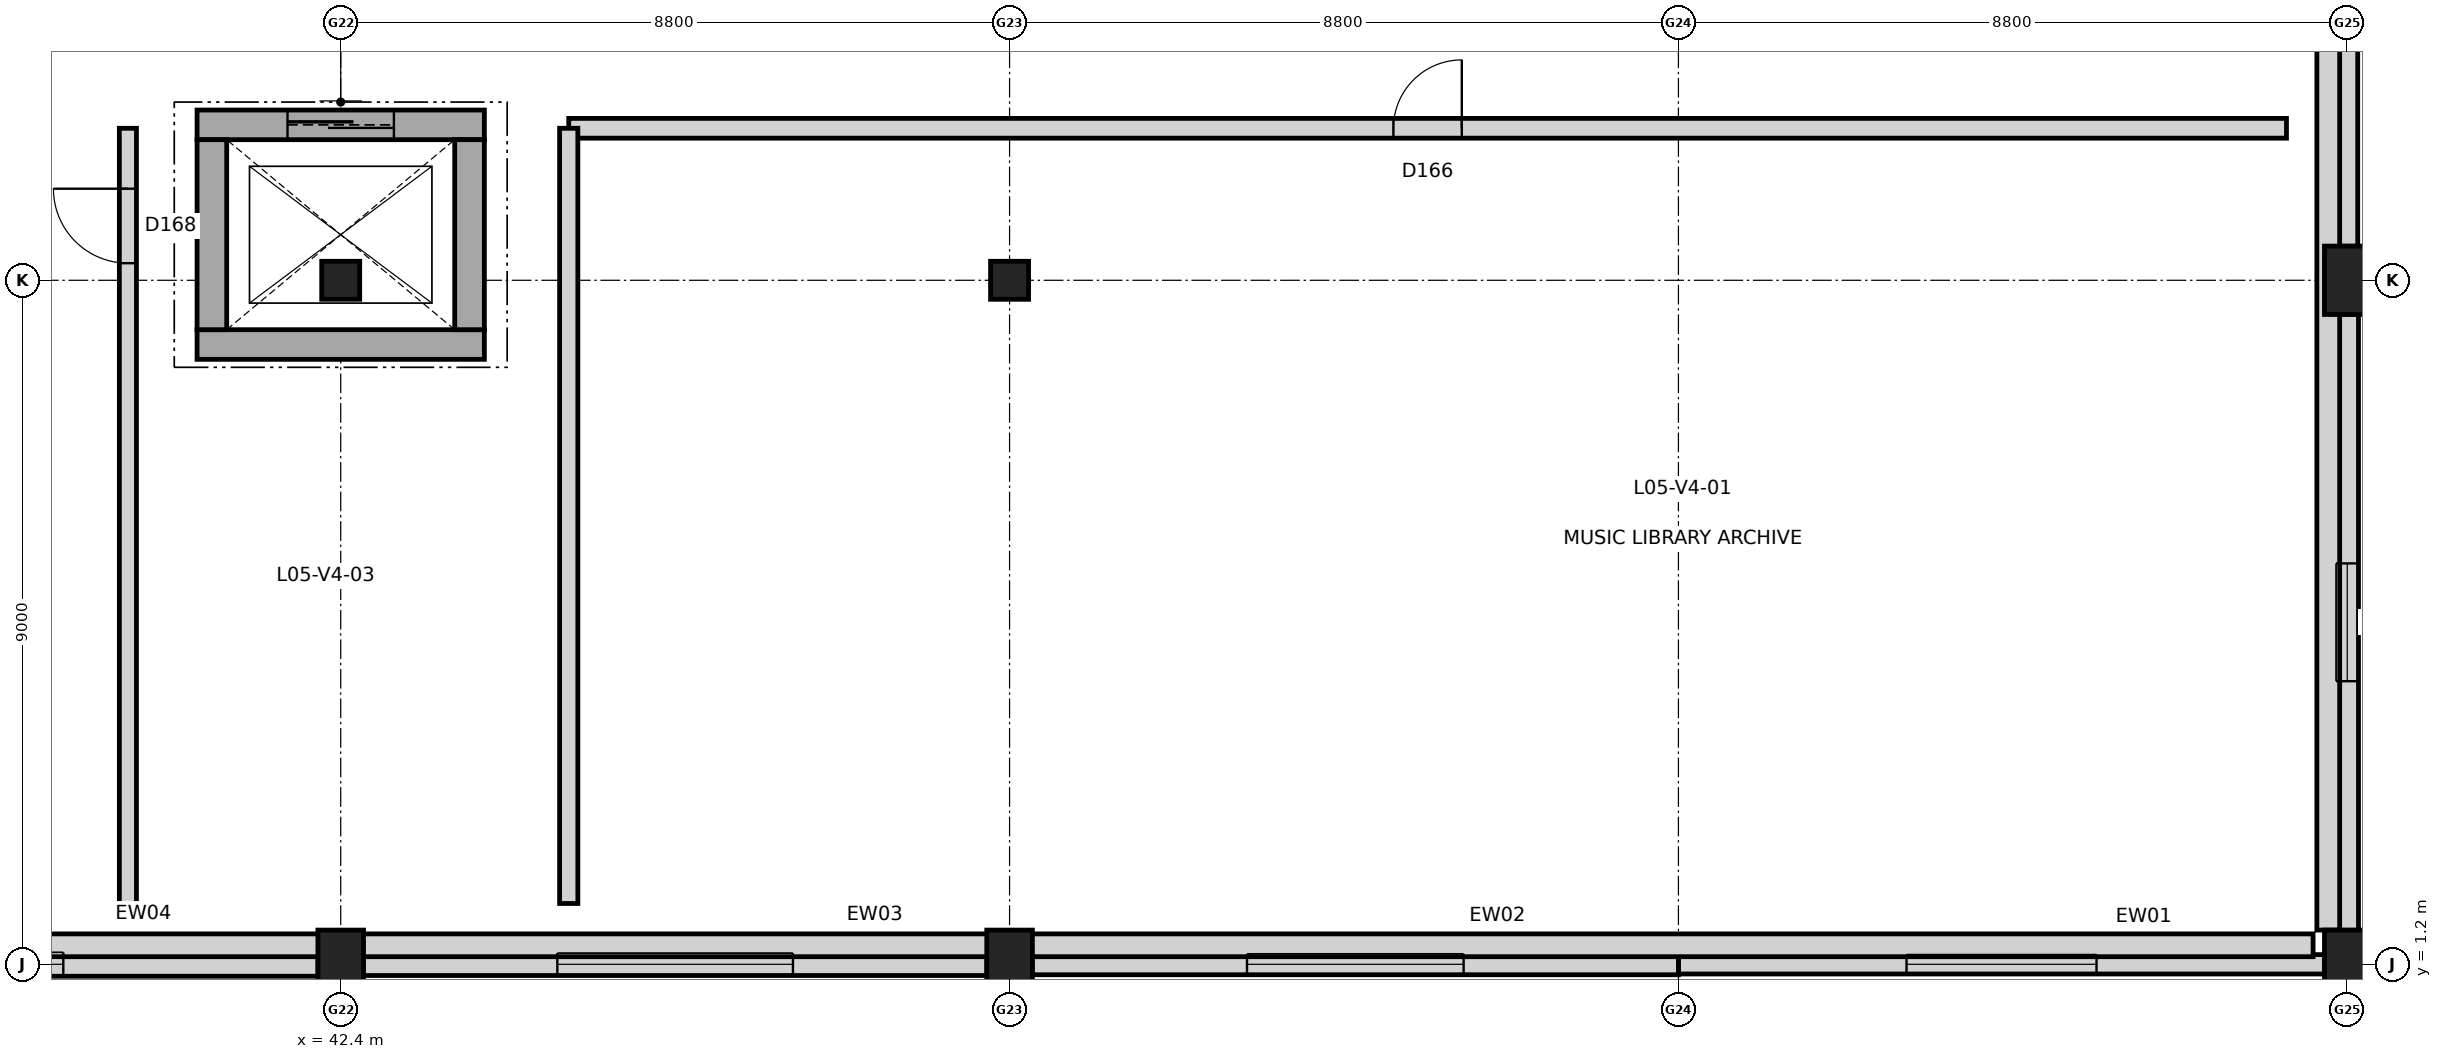
"""IFC4 building model, lengths in metres.
Left out: names, types, materials, properties, quantities, classifications, styles, units other than length and angle.
Written with IfcOpenShell. Run it as: python <this file> out.ifc"""

import sys

from ifc_helpers import new_model, si_unit, direction, frame, frame_2d, origin, origin_2d, place, context, subcontext, project, spatial, rectangle, extrude, element, fill, save


model = new_model("IFC4")
c1 = context("Model", 3, precision=1e-05, world=origin(), true_north=direction((0.0, 1.0)))
c2 = subcontext(c1, "Body", "Model", "MODEL_VIEW")
j1 = project(units=[si_unit("LENGTHUNIT", "METRE"), si_unit("PLANEANGLEUNIT", "RADIAN")], contexts=[c1])
p1 = place(None, origin())
s1 = spatial("IfcSite", under=j1, at=p1, CompositionType="ELEMENT")
p2 = place(p1, origin())
s2 = spatial("IfcBuilding", under=s1, at=p2, CompositionType="ELEMENT")
p3 = place(p2, frame((0.0, 0.0, 24.6)))
s3 = spatial("IfcBuildingStorey", under=s2, at=p3, CompositionType="ELEMENT", Elevation=24.6)
p4 = place(p3, frame((42.4, 1.2, 0.0), z_axis=(0.0, 0.0, 1.0), x_axis=(1.0, 0.0, 0.0)))
e1 = element("IfcColumn", 1, at=p4, inside=s3, PredefinedType="COLUMN", context=c2, shape_type="SweptSolid", body=[
    extrude(rectangle(XDim=0.6, YDim=0.9, at=origin_2d()), origin(), (0.0, 0.0, 1.0), 5.4),
])
p5 = place(p3, frame((42.4, 10.2, 0.0), z_axis=(0.0, 0.0, 1.0), x_axis=(1.0, 0.0, 0.0)))
e2 = element("IfcColumn", 2, at=p5, inside=s3, PredefinedType="COLUMN", context=c2, shape_type="SweptSolid", body=[
    extrude(rectangle(XDim=0.5, YDim=0.5, at=origin_2d()), origin(), (0.0, 0.0, 1.0), 5.4),
])
p6 = place(p3, frame((51.2, 1.2, 0.0), z_axis=(0.0, 0.0, 1.0), x_axis=(1.0, 0.0, 0.0)))
e3 = element("IfcColumn", 3, at=p6, inside=s3, PredefinedType="COLUMN", context=c2, shape_type="SweptSolid", body=[
    extrude(rectangle(XDim=0.6, YDim=0.9, at=origin_2d()), origin(), (0.0, 0.0, 1.0), 5.4),
])
p7 = place(p3, frame((51.2, 10.2, 0.0), z_axis=(0.0, 0.0, 1.0), x_axis=(1.0, 0.0, 0.0)))
e4 = element("IfcColumn", 4, at=p7, inside=s3, PredefinedType="COLUMN", context=c2, shape_type="SweptSolid", body=[
    extrude(rectangle(XDim=0.5, YDim=0.5, at=origin_2d()), origin(), (0.0, 0.0, 1.0), 5.4),
])
for number, where, z_axis, x_axis in (
    (5, (68.8, 1.2, 0.0), (0.0, 0.0, 1.0), (1.0, 0.0, 0.0)),
    (6, (68.8, 10.2, 0.0), (0.0, 0.0, 1.0), (1.0, 0.0, 0.0)),
):
    element("IfcColumn", number, at=place(p3, frame(where, z_axis=z_axis, x_axis=x_axis)), inside=s3, PredefinedType="COLUMN", context=c2, shape_type="SweptSolid", body=[
        extrude(rectangle(XDim=0.6, YDim=0.9, at=origin_2d()), origin(), (0.0, 0.0, 1.0), 5.4),
    ])
p8 = place(p3, frame((68.502, 1.2, 0.0), z_axis=(0.0, 0.0, 1.0), x_axis=(-1.0, 0.0, 0.0)))
e7 = element("IfcWall", 7, at=p8, inside=s3, PredefinedType="STANDARD", context=c2, shape_type="SweptSolid", body=[
    extrude(rectangle(XDim=8.502, YDim=0.255, at=frame_2d((4.251, 0.0))), origin(), (0.0, 0.0, 1.0), 4.267),
])
p9 = place(p8, frame((3.001, 0.0, 0.85)))
e8 = element("IfcOpeningElement", 8, at=p9, cuts=e7, PredefinedType="OPENING", context=c2, shape_type="SweptSolid", body=[
    extrude(rectangle(XDim=2.5, YDim=2.1, at=frame_2d((1.25, 1.05))), frame((0.0, 0.137, 0.0), z_axis=(0.0, -1.0, 0.0), x_axis=(1.0, 0.0, 0.0)), (0.0, 0.0, 1.0), 0.275),
])
p10 = place(p3, frame((60.0, 1.2, 0.0), z_axis=(0.0, 0.0, 1.0), x_axis=(-1.0, 0.0, 0.0)))
e9 = element("IfcWall", 9, at=p10, inside=s3, PredefinedType="STANDARD", context=c2, shape_type="SweptSolid", body=[
    extrude(rectangle(XDim=8.502, YDim=0.275, at=frame_2d((4.251, 0.0))), origin(), (0.0, 0.0, 1.0), 4.267),
])
p11 = place(p10, frame((2.826, 0.0, 0.85)))
e10 = element("IfcOpeningElement", 10, at=p11, cuts=e9, PredefinedType="OPENING", context=c2, shape_type="SweptSolid", body=[
    extrude(rectangle(XDim=2.85, YDim=2.1, at=frame_2d((1.425, 1.05))), frame((0.0, 0.147, 0.0), z_axis=(0.0, -1.0, 0.0), x_axis=(1.0, 0.0, 0.0)), (0.0, 0.0, 1.0), 0.295),
])
p12 = place(p3, frame((50.902, 1.2, 0.0), z_axis=(0.0, 0.0, 1.0), x_axis=(-1.0, 0.0, 0.0)))
e11 = element("IfcWall", 11, at=p12, inside=s3, PredefinedType="STANDARD", context=c2, shape_type="SweptSolid", body=[
    extrude(rectangle(XDim=8.204, YDim=0.295, at=frame_2d((4.102, 0.0))), origin(), (0.0, 0.0, 1.0), 4.345),
])
p13 = place(p12, frame((2.552, 0.0, 0.85)))
e12 = element("IfcOpeningElement", 12, at=p13, cuts=e11, PredefinedType="OPENING", context=c2, shape_type="SweptSolid", body=[
    extrude(rectangle(XDim=3.1, YDim=2.1, at=frame_2d((1.55, 1.05))), frame((0.0, 0.157, 0.0), z_axis=(0.0, -1.0, 0.0), x_axis=(1.0, 0.0, 0.0)), (0.0, 0.0, 1.0), 0.315),
])
p14 = place(p3, frame((42.102, 1.2, 0.0), z_axis=(0.0, 0.0, 1.0), x_axis=(-1.0, 0.0, 0.0)))
e13 = element("IfcWall", 13, at=p14, inside=s3, PredefinedType="STANDARD", context=c2, shape_type="SweptSolid", body=[
    extrude(rectangle(XDim=8.204, YDim=0.315, at=frame_2d((4.102, 0.0))), origin(), (0.0, 0.0, 1.0), 4.345),
])
p15 = place(p14, frame((3.352, 0.0, 0.6)))
e14 = element("IfcOpeningElement", 14, at=p15, cuts=e13, PredefinedType="OPENING", context=c2, shape_type="SweptSolid", body=[
    extrude(rectangle(XDim=1.5, YDim=2.35, at=frame_2d((0.75, 1.175))), frame((0.0, 0.167, 0.0), z_axis=(0.0, -1.0, 0.0), x_axis=(1.0, 0.0, 0.0)), (0.0, 0.0, 1.0), 0.335),
])
p16 = place(p3, frame((68.8, 17.252, 0.0), z_axis=(0.0, 0.0, 1.0), x_axis=(0.0, -1.0, 0.0)))
e15 = element("IfcWall", 15, at=p16, inside=s3, PredefinedType="STANDARD", context=c2, shape_type="SweptSolid", body=[
    extrude(rectangle(XDim=6.604, YDim=0.275, at=frame_2d((3.302, 0.0))), origin(), (0.0, 0.0, 1.0), 4.429),
])
p17 = place(p16, frame((2.602, 0.0, 0.85)))
e16 = element("IfcOpeningElement", 16, at=p17, cuts=e15, PredefinedType="OPENING", context=c2, shape_type="SweptSolid", body=[
    extrude(rectangle(XDim=1.4, YDim=1.6, at=frame_2d((0.7, 0.8))), frame((0.0, 0.147, 0.0), z_axis=(0.0, -1.0, 0.0), x_axis=(1.0, 0.0, 0.0)), (0.0, 0.0, 1.0), 0.295),
])
p18 = place(p3, frame((68.8, 9.752, 0.0), z_axis=(0.0, 0.0, 1.0), x_axis=(0.0, -1.0, 0.0)))
e17 = element("IfcWall", 17, at=p18, inside=s3, PredefinedType="STANDARD", context=c2, shape_type="SweptSolid", body=[
    extrude(rectangle(XDim=8.104, YDim=0.295, at=frame_2d((4.052, 0.0))), origin(), (0.0, 0.0, 1.0), 4.429),
])
p19 = place(p18, frame((3.277, 0.0, 0.85)))
e18 = element("IfcOpeningElement", 18, at=p19, cuts=e17, PredefinedType="OPENING", context=c2, shape_type="SweptSolid", body=[
    extrude(rectangle(XDim=1.55, YDim=1.75, at=frame_2d((0.775, 0.875))), frame((0.0, 0.157, 0.0), z_axis=(0.0, -1.0, 0.0), x_axis=(1.0, 0.0, 0.0)), (0.0, 0.0, 1.0), 0.315),
])
p20 = place(p3, frame((34.05, 1.45, 5.4), z_axis=(0.0, 0.0, 1.0), x_axis=(1.0, 0.0, 0.0)))
e19 = element("IfcWall", 19, at=p20, inside=s3, PredefinedType="PARAPET", context=c2, shape_type="SweptSolid", body=[
    extrude(rectangle(XDim=34.3, YDim=0.3, at=frame_2d((17.15, 0.0))), origin(), (0.0, 0.0, 1.0), 1.15),
])
p21 = place(p3, frame((68.55, 1.65, 5.4), z_axis=(0.0, 0.0, 1.0), x_axis=(0.0, 1.0, 0.0)))
e20 = element("IfcWall", 20, at=p21, inside=s3, PredefinedType="PARAPET", context=c2, shape_type="SweptSolid", body=[
    extrude(rectangle(XDim=23.1, YDim=0.3, at=frame_2d((11.55, 0.0))), origin(), (0.0, 0.0, 1.0), 1.15),
])
p22 = place(p3, frame((44.29, 9.355, 0.0), z_axis=(0.0, 0.0, 1.0), x_axis=(-1.0, 0.0, 0.0)))
e21 = element("IfcWall", 21, at=p22, inside=s3, PredefinedType="SHEAR", context=c2, shape_type="SweptSolid", body=[
    extrude(rectangle(XDim=3.78, YDim=0.39, at=frame_2d((1.89, 0.0))), origin(), (0.0, 0.0, 1.0), 4.645),
])
p23 = place(p3, frame((40.51, 12.245, 0.0), z_axis=(0.0, 0.0, 1.0), x_axis=(1.0, 0.0, 0.0)))
e22 = element("IfcWall", 22, at=p23, inside=s3, PredefinedType="SHEAR", context=c2, shape_type="SweptSolid", body=[
    extrude(rectangle(XDim=3.78, YDim=0.39, at=frame_2d((1.89, 0.0))), origin(), (0.0, 0.0, 1.0), 4.645),
])
p24 = place(p23, frame((1.19, 0.0, 0.0)))
e23 = element("IfcOpeningElement", 23, at=p24, cuts=e22, PredefinedType="OPENING", context=c2, shape_type="SweptSolid", body=[
    extrude(rectangle(XDim=1.4, YDim=2.2, at=frame_2d((0.7, 1.1))), frame((0.0, 0.205, 0.0), z_axis=(0.0, -1.0, 0.0), x_axis=(1.0, 0.0, 0.0)), (0.0, 0.0, 1.0), 0.41),
])
for number, where, z_axis, x_axis in (
    (24, (40.705, 9.55, 0.0), (0.0, 0.0, 1.0), (0.0, 1.0, 0.0)),
    (25, (44.095, 12.05, 0.0), (0.0, 0.0, 1.0), (0.0, -1.0, 0.0)),
):
    element("IfcWall", number, at=place(p3, frame(where, z_axis=z_axis, x_axis=x_axis)), inside=s3, PredefinedType="SHEAR", context=c2, shape_type="SweptSolid", body=[
        extrude(rectangle(XDim=2.5, YDim=0.39, at=frame_2d((1.25, 0.0))), origin(), (0.0, 0.0, 1.0), 4.645),
    ])
p25 = place(p3, frame((45.4, 12.2, 0.0), z_axis=(0.0, 0.0, 1.0), x_axis=(1.0, 0.0, 0.0)))
e26 = element("IfcWall", 26, at=p25, inside=s3, PredefinedType="PARTITIONING", context=c2, shape_type="SweptSolid", body=[
    extrude(rectangle(XDim=22.6, YDim=0.26, at=frame_2d((11.3, 0.0))), origin(), (0.0, 0.0, 1.0), 5.02),
])
p26 = place(p25, frame((10.85, 0.0, 0.0)))
e27 = element("IfcOpeningElement", 27, at=p26, cuts=e26, PredefinedType="OPENING", context=c2, shape_type="SweptSolid", body=[
    extrude(rectangle(XDim=0.9, YDim=2.1, at=frame_2d((0.45, 1.05))), frame((0.0, 0.14, 0.0), z_axis=(0.0, -1.0, 0.0), x_axis=(1.0, 0.0, 0.0)), (0.0, 0.0, 1.0), 0.28),
])
p27 = place(p3, frame((45.4, 2.0, 0.0), z_axis=(0.0, 0.0, 1.0), x_axis=(0.0, 1.0, 0.0)))
e28 = element("IfcWall", 28, at=p27, inside=s3, PredefinedType="PARTITIONING", context=c2, shape_type="SweptSolid", body=[
    extrude(rectangle(XDim=10.2, YDim=0.24, at=frame_2d((5.1, 0.0))), origin(), (0.0, 0.0, 1.0), 5.02),
])
p28 = place(p3, frame((39.6, 2.0, 0.0), z_axis=(0.0, 0.0, 1.0), x_axis=(0.0, 1.0, 0.0)))
e29 = element("IfcWall", 29, at=p28, inside=s3, PredefinedType="PARTITIONING", context=c2, shape_type="SweptSolid", body=[
    extrude(rectangle(XDim=10.2, YDim=0.225, at=frame_2d((5.1, 0.0))), origin(), (0.0, 0.0, 1.0), 5.02),
])
p29 = place(p28, frame((8.425, 0.0, 0.0)))
e30 = element("IfcOpeningElement", 30, at=p29, cuts=e29, PredefinedType="OPENING", context=c2, shape_type="SweptSolid", body=[
    extrude(rectangle(XDim=0.98, YDim=2.15, at=frame_2d((0.49, 1.075))), frame((0.0, 0.123, 0.0), z_axis=(0.0, -1.0, 0.0), x_axis=(1.0, 0.0, 0.0)), (0.0, 0.0, 1.0), 0.245),
])
p30 = place(p9, origin())
e31 = element("IfcWindow", 31, at=p30, inside=s3, PartitioningType="SINGLE_PANEL", PredefinedType="WINDOW", context=c2, shape_type="SweptSolid", body=[
    extrude(rectangle(XDim=2.5, YDim=2.1, at=frame_2d((1.25, 1.05))), frame((0.0, 0.03, 0.0), z_axis=(0.0, -1.0, 0.0), x_axis=(1.0, 0.0, 0.0)), (0.0, 0.0, 1.0), 0.06),
])
fill(e8, e31)
p31 = place(p11, origin())
e32 = element("IfcWindow", 32, at=p31, inside=s3, PartitioningType="SINGLE_PANEL", PredefinedType="WINDOW", context=c2, shape_type="SweptSolid", body=[
    extrude(rectangle(XDim=2.85, YDim=2.1, at=frame_2d((1.425, 1.05))), frame((0.0, 0.03, 0.0), z_axis=(0.0, -1.0, 0.0), x_axis=(1.0, 0.0, 0.0)), (0.0, 0.0, 1.0), 0.06),
])
fill(e10, e32)
p32 = place(p13, origin())
e33 = element("IfcWindow", 33, at=p32, inside=s3, PartitioningType="SINGLE_PANEL", PredefinedType="WINDOW", context=c2, shape_type="SweptSolid", body=[
    extrude(rectangle(XDim=3.1, YDim=2.1, at=frame_2d((1.55, 1.05))), frame((0.0, 0.03, 0.0), z_axis=(0.0, -1.0, 0.0), x_axis=(1.0, 0.0, 0.0)), (0.0, 0.0, 1.0), 0.06),
])
fill(e12, e33)
p33 = place(p15, origin())
e34 = element("IfcWindow", 34, at=p33, inside=s3, PartitioningType="SINGLE_PANEL", PredefinedType="WINDOW", context=c2, shape_type="SweptSolid", body=[
    extrude(rectangle(XDim=1.5, YDim=2.35, at=frame_2d((0.75, 1.175))), frame((0.0, 0.03, 0.0), z_axis=(0.0, -1.0, 0.0), x_axis=(1.0, 0.0, 0.0)), (0.0, 0.0, 1.0), 0.06),
])
fill(e14, e34)
p34 = place(p19, origin())
e35 = element("IfcWindow", 35, at=p34, inside=s3, PartitioningType="SINGLE_PANEL", PredefinedType="WINDOW", context=c2, shape_type="SweptSolid", body=[
    extrude(rectangle(XDim=1.55, YDim=1.75, at=frame_2d((0.775, 0.875))), frame((0.0, 0.03, 0.0), z_axis=(0.0, -1.0, 0.0), x_axis=(1.0, 0.0, 0.0)), (0.0, 0.0, 1.0), 0.06),
])
fill(e18, e35)
p35 = place(p2, frame((0.0, 0.0, 41.4)))
p36 = place(p35, frame((0.0, 0.0, -11.675)))
p37 = place(p36, frame((42.4, 13.2, 0.0)))
p38 = place(p37, frame((0.0, 0.0, 0.225)))
e36 = element("IfcWindow", 36, at=p38, inside=s3, PartitioningType="SINGLE_PANEL", PredefinedType="SKYLIGHT", context=c2, shape_type="SweptSolid", body=[
    extrude(rectangle(XDim=1.8, YDim=1.8, at=origin_2d()), origin(), (0.0, 0.0, 1.0), 0.05),
])
p39 = place(p36, frame((51.2, 13.2, 0.0)))
p40 = place(p39, frame((0.0, 0.0, 0.225)))
e37 = element("IfcWindow", 37, at=p40, inside=s3, PartitioningType="SINGLE_PANEL", PredefinedType="SKYLIGHT", context=c2, shape_type="SweptSolid", body=[
    extrude(rectangle(XDim=2.2, YDim=1.8, at=origin_2d()), origin(), (0.0, 0.0, 1.0), 0.05),
])
p41 = place(p36, frame((60.0, 13.2, 0.0)))
p42 = place(p41, frame((0.0, 0.0, 0.225)))
e38 = element("IfcWindow", 38, at=p42, inside=s3, PartitioningType="SINGLE_PANEL", PredefinedType="SKYLIGHT", context=c2, shape_type="SweptSolid", body=[
    extrude(rectangle(XDim=2.4, YDim=2.4, at=origin_2d()), origin(), (0.0, 0.0, 1.0), 0.05),
])
p43 = place(p24, origin())
e39 = element("IfcDoor", 39, at=p43, inside=s3, OperationType="SLIDING_TO_LEFT", PredefinedType="DOOR", context=c2, shape_type="SweptSolid", body=[
    extrude(rectangle(XDim=1.4, YDim=2.2, at=frame_2d((0.7, 1.1))), frame((0.0, 0.025, 0.0), z_axis=(0.0, -1.0, 0.0), x_axis=(1.0, 0.0, 0.0)), (0.0, 0.0, 1.0), 0.05),
])
fill(e23, e39)
p44 = place(p26, origin())
e40 = element("IfcDoor", 40, at=p44, inside=s3, OperationType="SINGLE_SWING_RIGHT", PredefinedType="DOOR", context=c2, shape_type="SweptSolid", body=[
    extrude(rectangle(XDim=0.9, YDim=2.1, at=frame_2d((0.45, 1.05))), frame((0.0, 0.025, 0.0), z_axis=(0.0, -1.0, 0.0), x_axis=(1.0, 0.0, 0.0)), (0.0, 0.0, 1.0), 0.05),
])
fill(e27, e40)
p45 = place(p29, origin())
e41 = element("IfcDoor", 41, at=p45, inside=s3, OperationType="SINGLE_SWING_RIGHT", PredefinedType="DOOR", context=c2, shape_type="SweptSolid", body=[
    extrude(rectangle(XDim=0.98, YDim=2.15, at=frame_2d((0.49, 1.075))), frame((0.0, 0.025, 0.0), z_axis=(0.0, -1.0, 0.0), x_axis=(1.0, 0.0, 0.0)), (0.0, 0.0, 1.0), 0.05),
])
fill(e30, e41)
save(model, sys.argv[1])
